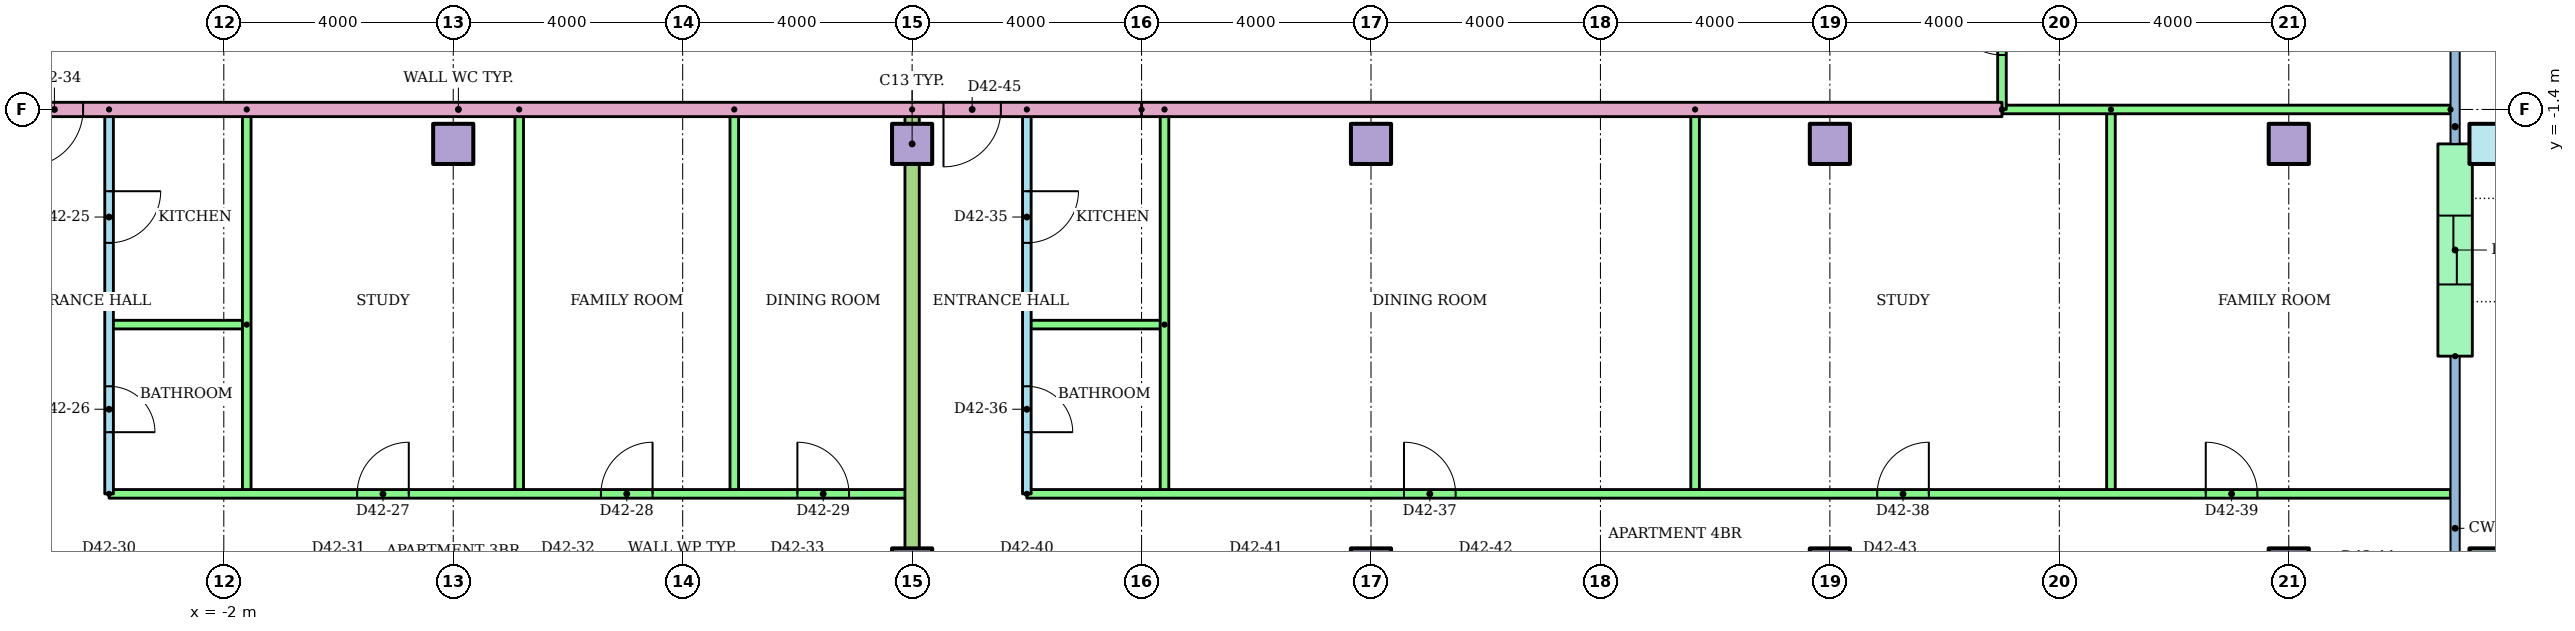
"""IFC4 building model, lengths in metres.
Left out: names, types, materials, properties, quantities, classifications, styles, units other than length and angle.
Written with IfcOpenShell. Run it as: python <this file> out.ifc"""

import sys

from ifc_helpers import new_model, si_unit, direction, frame, frame_2d, origin, origin_2d, place, context, subcontext, project, spatial, rectangle, hollow_rectangle, extrude, element, fill, save


model = new_model("IFC4")
c1 = context("Model", 3, precision=1e-05, world=origin(), true_north=direction((0.0, 1.0)))
c2 = subcontext(c1, "Body", "Model", "MODEL_VIEW")
j1 = project(units=[si_unit("LENGTHUNIT", "METRE"), si_unit("PLANEANGLEUNIT", "RADIAN")], contexts=[c1])
p1 = place(None, origin())
s1 = spatial("IfcSite", under=j1, at=p1, CompositionType="ELEMENT")
p2 = place(p1, origin())
s2 = spatial("IfcBuilding", under=s1, at=p2, CompositionType="ELEMENT")
p3 = place(p2, frame((0.0, 0.0, 165.3)))
s3 = spatial("IfcBuildingStorey", under=s2, at=p3, CompositionType="ELEMENT", Elevation=165.3)
for number, where in (
    (1, (2.0, -9.4, 0.0)),
    (2, (10.0, -9.4, 0.0)),
    (3, (18.0, -9.4, 0.0)),
    (4, (26.0, -9.4, 0.0)),
    (5, (34.0, -9.4, 0.0)),
):
    element("IfcColumn", number, at=place(p3, frame(where)), inside=s3, PredefinedType="COLUMN", context=c2, shape_type="SweptSolid", body=[
        extrude(rectangle(XDim=0.7, YDim=0.7, at=origin_2d()), origin(), (0.0, 0.0, 1.0), 3.2),
    ])
p4 = place(p3, frame((37.5, -9.4, 0.0)))
e6 = element("IfcColumn", 6, at=p4, inside=s3, PredefinedType="COLUMN", context=c2, shape_type="SweptSolid", body=[
    extrude(hollow_rectangle(XDim=0.7, YDim=0.7, WallThickness=0.036, at=origin_2d()), origin(), (0.0, 0.0, 1.0), 3.2),
])
for number, where in (
    (7, (2.0, -2.0, 0.0)),
    (8, (10.0, -2.0, 0.0)),
    (9, (18.0, -2.0, 0.0)),
    (10, (26.0, -2.0, 0.0)),
    (11, (34.0, -2.0, 0.0)),
):
    element("IfcColumn", number, at=place(p3, frame(where)), inside=s3, PredefinedType="COLUMN", context=c2, shape_type="SweptSolid", body=[
        extrude(rectangle(XDim=0.7, YDim=0.7, at=origin_2d()), origin(), (0.0, 0.0, 1.0), 3.2),
    ])
p5 = place(p3, frame((37.5, -2.0, 0.0)))
e12 = element("IfcColumn", 12, at=p5, inside=s3, PredefinedType="COLUMN", context=c2, shape_type="SweptSolid", body=[
    extrude(hollow_rectangle(XDim=0.7, YDim=0.7, WallThickness=0.036, at=origin_2d()), origin(), (0.0, 0.0, 1.0), 3.2),
])
p6 = place(p3, frame((36.9, -5.7, 0.0), z_axis=(0.0, 0.0, 1.0), x_axis=(0.0, 1.0, 0.0)))
e13 = element("IfcWall", 13, at=p6, inside=s3, PredefinedType="STANDARD", context=c2, shape_type="SweptSolid", body=[
    extrude(rectangle(XDim=3.7, YDim=0.6, at=frame_2d((1.85, 0.0))), origin(), (0.0, 0.0, 1.0), 2.92),
])
p7 = place(p6, frame((1.25, 0.0, 0.0)))
e14 = element("IfcOpeningElement", 14, at=p7, cuts=e13, PredefinedType="OPENING", context=c2, shape_type="SweptSolid", body=[
    extrude(rectangle(XDim=1.2, YDim=2.1, at=frame_2d((0.6, 1.05))), frame((0.0, 0.31, 0.0), z_axis=(0.0, -1.0, 0.0), x_axis=(1.0, 0.0, 0.0)), (0.0, 0.0, 1.0), 0.62),
])
p8 = place(p3, frame((-4.0, -1.4, 0.0), z_axis=(0.0, 0.0, 1.0), x_axis=(0.0, -1.0, 0.0)))
e15 = element("IfcWall", 15, at=p8, inside=s3, PredefinedType="PARTITIONING", context=c2, shape_type="SweptSolid", body=[
    extrude(rectangle(XDim=6.7, YDim=0.15, at=frame_2d((3.35, 0.0))), origin(), (0.0, 0.0, 1.0), 2.4),
])
p9 = place(p8, frame((1.425, 0.0, 0.0)))
e16 = element("IfcOpeningElement", 16, at=p9, cuts=e15, PredefinedType="OPENING", context=c2, shape_type="SweptSolid", body=[
    extrude(rectangle(XDim=0.9, YDim=2.1, at=frame_2d((0.45, 1.05))), frame((0.0, 0.085, 0.0), z_axis=(0.0, -1.0, 0.0), x_axis=(1.0, 0.0, 0.0)), (0.0, 0.0, 1.0), 0.17),
])
p10 = place(p8, frame((4.825, 0.0, 0.0)))
e17 = element("IfcOpeningElement", 17, at=p10, cuts=e15, PredefinedType="OPENING", context=c2, shape_type="SweptSolid", body=[
    extrude(rectangle(XDim=0.8, YDim=2.1, at=frame_2d((0.4, 1.05))), frame((0.0, 0.085, 0.0), z_axis=(0.0, -1.0, 0.0), x_axis=(1.0, 0.0, 0.0)), (0.0, 0.0, 1.0), 0.17),
])
p11 = place(p3, frame((-1.6, -5.15, 0.0), z_axis=(0.0, 0.0, 1.0), x_axis=(-1.0, 0.0, 0.0)))
e18 = element("IfcWall", 18, at=p11, inside=s3, PredefinedType="PARTITIONING", context=c2, shape_type="SweptSolid", body=[
    extrude(rectangle(XDim=2.4, YDim=0.15, at=frame_2d((1.2, 0.0))), origin(), (0.0, 0.0, 1.0), 2.4),
])
for number, where, z_axis, x_axis in (
    (19, (-1.6, -1.4, 0.0), (0.0, 0.0, 1.0), (0.0, -1.0, 0.0)),
    (20, (3.15, -1.4, 0.0), (0.0, 0.0, 1.0), (0.0, -1.0, 0.0)),
    (21, (6.9, -1.4, 0.0), (0.0, 0.0, 1.0), (0.0, -1.0, 0.0)),
):
    element("IfcWall", number, at=place(p3, frame(where, z_axis=z_axis, x_axis=x_axis)), inside=s3, PredefinedType="PARTITIONING", context=c2, shape_type="SweptSolid", body=[
        extrude(rectangle(XDim=6.7, YDim=0.15, at=frame_2d((3.35, 0.0))), origin(), (0.0, 0.0, 1.0), 2.4),
    ])
p12 = place(p3, frame((-4.0, -8.1, 0.0)))
e22 = element("IfcWall", 22, at=p12, inside=s3, PredefinedType="PARTITIONING", context=c2, shape_type="SweptSolid", body=[
    extrude(rectangle(XDim=14.0, YDim=0.15, at=frame_2d((7.0, 0.0))), origin(), (0.0, 0.0, 1.0), 2.4),
])
p13 = place(p12, frame((4.325, 0.0, 0.0)))
e23 = element("IfcOpeningElement", 23, at=p13, cuts=e22, PredefinedType="OPENING", context=c2, shape_type="SweptSolid", body=[
    extrude(rectangle(XDim=0.9, YDim=2.1, at=frame_2d((0.45, 1.05))), frame((0.0, 0.085, 0.0), z_axis=(0.0, -1.0, 0.0), x_axis=(1.0, 0.0, 0.0)), (0.0, 0.0, 1.0), 0.17),
])
p14 = place(p12, frame((8.575, 0.0, 0.0)))
e24 = element("IfcOpeningElement", 24, at=p14, cuts=e22, PredefinedType="OPENING", context=c2, shape_type="SweptSolid", body=[
    extrude(rectangle(XDim=0.9, YDim=2.1, at=frame_2d((0.45, 1.05))), frame((0.0, 0.085, 0.0), z_axis=(0.0, -1.0, 0.0), x_axis=(1.0, 0.0, 0.0)), (0.0, 0.0, 1.0), 0.17),
])
p15 = place(p12, frame((12.0, 0.0, 0.0)))
e25 = element("IfcOpeningElement", 25, at=p15, cuts=e22, PredefinedType="OPENING", context=c2, shape_type="SweptSolid", body=[
    extrude(rectangle(XDim=0.9, YDim=2.1, at=frame_2d((0.45, 1.05))), frame((0.0, 0.085, 0.0), z_axis=(0.0, -1.0, 0.0), x_axis=(1.0, 0.0, 0.0)), (0.0, 0.0, 1.0), 0.17),
])
p16 = place(p3, frame((12.0, -1.4, 0.0), z_axis=(0.0, 0.0, 1.0), x_axis=(0.0, -1.0, 0.0)))
e26 = element("IfcWall", 26, at=p16, inside=s3, PredefinedType="PARTITIONING", context=c2, shape_type="SweptSolid", body=[
    extrude(rectangle(XDim=6.7, YDim=0.15, at=frame_2d((3.35, 0.0))), origin(), (0.0, 0.0, 1.0), 2.4),
])
p17 = place(p16, frame((1.425, 0.0, 0.0)))
e27 = element("IfcOpeningElement", 27, at=p17, cuts=e26, PredefinedType="OPENING", context=c2, shape_type="SweptSolid", body=[
    extrude(rectangle(XDim=0.9, YDim=2.1, at=frame_2d((0.45, 1.05))), frame((0.0, 0.085, 0.0), z_axis=(0.0, -1.0, 0.0), x_axis=(1.0, 0.0, 0.0)), (0.0, 0.0, 1.0), 0.17),
])
p18 = place(p16, frame((4.825, 0.0, 0.0)))
e28 = element("IfcOpeningElement", 28, at=p18, cuts=e26, PredefinedType="OPENING", context=c2, shape_type="SweptSolid", body=[
    extrude(rectangle(XDim=0.8, YDim=2.1, at=frame_2d((0.4, 1.05))), frame((0.0, 0.085, 0.0), z_axis=(0.0, -1.0, 0.0), x_axis=(1.0, 0.0, 0.0)), (0.0, 0.0, 1.0), 0.17),
])
p19 = place(p3, frame((14.4, -5.15, 0.0), z_axis=(0.0, 0.0, 1.0), x_axis=(-1.0, 0.0, 0.0)))
e29 = element("IfcWall", 29, at=p19, inside=s3, PredefinedType="PARTITIONING", context=c2, shape_type="SweptSolid", body=[
    extrude(rectangle(XDim=2.4, YDim=0.15, at=frame_2d((1.2, 0.0))), origin(), (0.0, 0.0, 1.0), 2.4),
])
for number, where, z_axis, x_axis in (
    (30, (14.4, -1.4, 0.0), (0.0, 0.0, 1.0), (0.0, -1.0, 0.0)),
    (31, (23.65, -1.4, 0.0), (0.0, 0.0, 1.0), (0.0, -1.0, 0.0)),
    (32, (30.9, -1.4, 0.0), (0.0, 0.0, 1.0), (0.0, -1.0, 0.0)),
):
    element("IfcWall", number, at=place(p3, frame(where, z_axis=z_axis, x_axis=x_axis)), inside=s3, PredefinedType="PARTITIONING", context=c2, shape_type="SweptSolid", body=[
        extrude(rectangle(XDim=6.7, YDim=0.15, at=frame_2d((3.35, 0.0))), origin(), (0.0, 0.0, 1.0), 2.4),
    ])
p20 = place(p3, frame((12.0, -8.1, 0.0)))
e33 = element("IfcWall", 33, at=p20, inside=s3, PredefinedType="PARTITIONING", context=c2, shape_type="SweptSolid", body=[
    extrude(rectangle(XDim=24.82, YDim=0.15, at=frame_2d((12.41, 0.0))), origin(), (0.0, 0.0, 1.0), 2.4),
])
p21 = place(p20, frame((6.575, 0.0, 0.0)))
e34 = element("IfcOpeningElement", 34, at=p21, cuts=e33, PredefinedType="OPENING", context=c2, shape_type="SweptSolid", body=[
    extrude(rectangle(XDim=0.9, YDim=2.1, at=frame_2d((0.45, 1.05))), frame((0.0, 0.085, 0.0), z_axis=(0.0, -1.0, 0.0), x_axis=(1.0, 0.0, 0.0)), (0.0, 0.0, 1.0), 0.17),
])
p22 = place(p20, frame((14.825, 0.0, 0.0)))
e35 = element("IfcOpeningElement", 35, at=p22, cuts=e33, PredefinedType="OPENING", context=c2, shape_type="SweptSolid", body=[
    extrude(rectangle(XDim=0.9, YDim=2.1, at=frame_2d((0.45, 1.05))), frame((0.0, 0.085, 0.0), z_axis=(0.0, -1.0, 0.0), x_axis=(1.0, 0.0, 0.0)), (0.0, 0.0, 1.0), 0.17),
])
p23 = place(p20, frame((20.553, 0.0, 0.0)))
e36 = element("IfcOpeningElement", 36, at=p23, cuts=e33, PredefinedType="OPENING", context=c2, shape_type="SweptSolid", body=[
    extrude(rectangle(XDim=0.9, YDim=2.1, at=frame_2d((0.45, 1.05))), frame((0.0, 0.085, 0.0), z_axis=(0.0, -1.0, 0.0), x_axis=(1.0, 0.0, 0.0)), (0.0, 0.0, 1.0), 0.17),
])
p24 = place(p3, frame((10.0, -1.4, 0.0), z_axis=(0.0, 0.0, 1.0), x_axis=(0.0, -1.0, 0.0)))
e37 = element("IfcWall", 37, at=p24, inside=s3, PredefinedType="PARTITIONING", context=c2, shape_type="SweptSolid", body=[
    extrude(rectangle(XDim=15.01, YDim=0.25, at=frame_2d((7.505, 0.0))), origin(), (0.0, 0.0, 1.0), 2.4),
])
p25 = place(p3, frame((29.0, -1.4, 0.0), z_axis=(0.0, 0.0, 1.0), x_axis=(-1.0, 0.0, 0.0)))
e38 = element("IfcWall", 38, at=p25, inside=s3, PredefinedType="PARTITIONING", context=c2, shape_type="SweptSolid", body=[
    extrude(rectangle(XDim=15.0, YDim=0.25, at=frame_2d((7.5, 0.0))), origin(), (0.0, 0.0, 1.0), 2.4),
])
p26 = place(p3, frame((36.82, -1.4, 0.0), z_axis=(0.0, 0.0, 1.0), x_axis=(-1.0, 0.0, 0.0)))
e39 = element("IfcWall", 39, at=p26, inside=s3, PredefinedType="PARTITIONING", context=c2, shape_type="SweptSolid", body=[
    extrude(rectangle(XDim=7.82, YDim=0.15, at=frame_2d((3.91, 0.0))), origin(), (0.0, 0.0, 1.0), 2.4),
])
p27 = place(p3, frame((29.0, -1.4, 0.0), z_axis=(0.0, 0.0, 1.0), x_axis=(0.0, 1.0, 0.0)))
e40 = element("IfcWall", 40, at=p27, inside=s3, PredefinedType="PARTITIONING", context=c2, shape_type="SweptSolid", body=[
    extrude(rectangle(XDim=2.8, YDim=0.15, at=frame_2d((1.4, 0.0))), origin(), (0.0, 0.0, 1.0), 2.4),
])
p28 = place(p27, frame((0.95, 0.0, 0.0)))
e41 = element("IfcOpeningElement", 41, at=p28, cuts=e40, PredefinedType="OPENING", context=c2, shape_type="SweptSolid", body=[
    extrude(rectangle(XDim=0.9, YDim=2.1, at=frame_2d((0.45, 1.05))), frame((0.0, 0.085, 0.0), z_axis=(0.0, -1.0, 0.0), x_axis=(1.0, 0.0, 0.0)), (0.0, 0.0, 1.0), 0.17),
])
p29 = place(p3, frame((14.0, -1.4, 0.0), z_axis=(0.0, 0.0, 1.0), x_axis=(-1.0, 0.0, 0.0)))
e42 = element("IfcWall", 42, at=p29, inside=s3, PredefinedType="PARTITIONING", context=c2, shape_type="SweptSolid", body=[
    extrude(rectangle(XDim=28.0, YDim=0.25, at=frame_2d((14.0, 0.0))), origin(), (0.0, 0.0, 1.0), 2.4),
])
p30 = place(p29, frame((20.547, 0.0, 0.0)))
e43 = element("IfcOpeningElement", 43, at=p30, cuts=e42, PredefinedType="OPENING", context=c2, shape_type="SweptSolid", body=[
    extrude(rectangle(XDim=1.0, YDim=2.1, at=frame_2d((0.5, 1.05))), frame((0.0, 0.135, 0.0), z_axis=(0.0, -1.0, 0.0), x_axis=(1.0, 0.0, 0.0)), (0.0, 0.0, 1.0), 0.27),
])
p31 = place(p29, frame((18.453, 0.0, 0.0)))
e44 = element("IfcOpeningElement", 44, at=p31, cuts=e42, PredefinedType="OPENING", context=c2, shape_type="SweptSolid", body=[
    extrude(rectangle(XDim=1.0, YDim=2.1, at=frame_2d((0.5, 1.05))), frame((0.0, 0.135, 0.0), z_axis=(0.0, -1.0, 0.0), x_axis=(1.0, 0.0, 0.0)), (0.0, 0.0, 1.0), 0.27),
])
p32 = place(p29, frame((2.453, 0.0, 0.0)))
e45 = element("IfcOpeningElement", 45, at=p32, cuts=e42, PredefinedType="OPENING", context=c2, shape_type="SweptSolid", body=[
    extrude(rectangle(XDim=1.0, YDim=2.1, at=frame_2d((0.5, 1.05))), frame((0.0, 0.135, 0.0), z_axis=(0.0, -1.0, 0.0), x_axis=(1.0, 0.0, 0.0)), (0.0, 0.0, 1.0), 0.27),
])
p33 = place(p9, origin())
e46 = element("IfcDoor", 46, at=p33, inside=s3, OperationType="SINGLE_SWING_LEFT", PredefinedType="DOOR", context=c2, shape_type="SweptSolid", body=[
    extrude(rectangle(XDim=0.9, YDim=2.1, at=frame_2d((0.45, 1.05))), frame((0.0, 0.025, 0.0), z_axis=(0.0, -1.0, 0.0), x_axis=(1.0, 0.0, 0.0)), (0.0, 0.0, 1.0), 0.05),
])
fill(e16, e46)
p34 = place(p10, origin())
e47 = element("IfcDoor", 47, at=p34, inside=s3, OperationType="SINGLE_SWING_RIGHT", PredefinedType="DOOR", context=c2, shape_type="SweptSolid", body=[
    extrude(rectangle(XDim=0.8, YDim=2.1, at=frame_2d((0.4, 1.05))), frame((0.0, 0.025, 0.0), z_axis=(0.0, -1.0, 0.0), x_axis=(1.0, 0.0, 0.0)), (0.0, 0.0, 1.0), 0.05),
])
fill(e17, e47)
p35 = place(p13, origin())
e48 = element("IfcDoor", 48, at=p35, inside=s3, OperationType="SINGLE_SWING_RIGHT", PredefinedType="DOOR", context=c2, shape_type="SweptSolid", body=[
    extrude(rectangle(XDim=0.9, YDim=2.1, at=frame_2d((0.45, 1.05))), frame((0.0, 0.025, 0.0), z_axis=(0.0, -1.0, 0.0), x_axis=(1.0, 0.0, 0.0)), (0.0, 0.0, 1.0), 0.05),
])
fill(e23, e48)
p36 = place(p14, origin())
e49 = element("IfcDoor", 49, at=p36, inside=s3, OperationType="SINGLE_SWING_RIGHT", PredefinedType="DOOR", context=c2, shape_type="SweptSolid", body=[
    extrude(rectangle(XDim=0.9, YDim=2.1, at=frame_2d((0.45, 1.05))), frame((0.0, 0.025, 0.0), z_axis=(0.0, -1.0, 0.0), x_axis=(1.0, 0.0, 0.0)), (0.0, 0.0, 1.0), 0.05),
])
fill(e24, e49)
p37 = place(p15, origin())
e50 = element("IfcDoor", 50, at=p37, inside=s3, OperationType="SINGLE_SWING_LEFT", PredefinedType="DOOR", context=c2, shape_type="SweptSolid", body=[
    extrude(rectangle(XDim=0.9, YDim=2.1, at=frame_2d((0.45, 1.05))), frame((0.0, 0.025, 0.0), z_axis=(0.0, -1.0, 0.0), x_axis=(1.0, 0.0, 0.0)), (0.0, 0.0, 1.0), 0.05),
])
fill(e25, e50)
p38 = place(p31, origin())
e51 = element("IfcDoor", 51, at=p38, inside=s3, OperationType="SINGLE_SWING_RIGHT", PredefinedType="DOOR", context=c2, shape_type="SweptSolid", body=[
    extrude(rectangle(XDim=1.0, YDim=2.1, at=frame_2d((0.5, 1.05))), frame((0.0, 0.025, 0.0), z_axis=(0.0, -1.0, 0.0), x_axis=(1.0, 0.0, 0.0)), (0.0, 0.0, 1.0), 0.05),
])
fill(e44, e51)
p39 = place(p17, origin())
e52 = element("IfcDoor", 52, at=p39, inside=s3, OperationType="SINGLE_SWING_LEFT", PredefinedType="DOOR", context=c2, shape_type="SweptSolid", body=[
    extrude(rectangle(XDim=0.9, YDim=2.1, at=frame_2d((0.45, 1.05))), frame((0.0, 0.025, 0.0), z_axis=(0.0, -1.0, 0.0), x_axis=(1.0, 0.0, 0.0)), (0.0, 0.0, 1.0), 0.05),
])
fill(e27, e52)
p40 = place(p18, origin())
e53 = element("IfcDoor", 53, at=p40, inside=s3, OperationType="SINGLE_SWING_RIGHT", PredefinedType="DOOR", context=c2, shape_type="SweptSolid", body=[
    extrude(rectangle(XDim=0.8, YDim=2.1, at=frame_2d((0.4, 1.05))), frame((0.0, 0.025, 0.0), z_axis=(0.0, -1.0, 0.0), x_axis=(1.0, 0.0, 0.0)), (0.0, 0.0, 1.0), 0.05),
])
fill(e28, e53)
p41 = place(p21, origin())
e54 = element("IfcDoor", 54, at=p41, inside=s3, OperationType="SINGLE_SWING_LEFT", PredefinedType="DOOR", context=c2, shape_type="SweptSolid", body=[
    extrude(rectangle(XDim=0.9, YDim=2.1, at=frame_2d((0.45, 1.05))), frame((0.0, 0.025, 0.0), z_axis=(0.0, -1.0, 0.0), x_axis=(1.0, 0.0, 0.0)), (0.0, 0.0, 1.0), 0.05),
])
fill(e34, e54)
p42 = place(p22, origin())
e55 = element("IfcDoor", 55, at=p42, inside=s3, OperationType="SINGLE_SWING_RIGHT", PredefinedType="DOOR", context=c2, shape_type="SweptSolid", body=[
    extrude(rectangle(XDim=0.9, YDim=2.1, at=frame_2d((0.45, 1.05))), frame((0.0, 0.025, 0.0), z_axis=(0.0, -1.0, 0.0), x_axis=(1.0, 0.0, 0.0)), (0.0, 0.0, 1.0), 0.05),
])
fill(e35, e55)
p43 = place(p23, origin())
e56 = element("IfcDoor", 56, at=p43, inside=s3, OperationType="SINGLE_SWING_LEFT", PredefinedType="DOOR", context=c2, shape_type="SweptSolid", body=[
    extrude(rectangle(XDim=0.9, YDim=2.1, at=frame_2d((0.45, 1.05))), frame((0.0, 0.025, 0.0), z_axis=(0.0, -1.0, 0.0), x_axis=(1.0, 0.0, 0.0)), (0.0, 0.0, 1.0), 0.05),
])
fill(e36, e56)
p44 = place(p32, origin())
e57 = element("IfcDoor", 57, at=p44, inside=s3, OperationType="SINGLE_SWING_RIGHT", PredefinedType="DOOR", context=c2, shape_type="SweptSolid", body=[
    extrude(rectangle(XDim=1.0, YDim=2.1, at=frame_2d((0.5, 1.05))), frame((0.0, 0.025, 0.0), z_axis=(0.0, -1.0, 0.0), x_axis=(1.0, 0.0, 0.0)), (0.0, 0.0, 1.0), 0.05),
])
fill(e45, e57)
p45 = place(p28, origin())
e58 = element("IfcDoor", 58, at=p45, inside=s3, OperationType="SINGLE_SWING_RIGHT", PredefinedType="DOOR", context=c2, shape_type="SweptSolid", body=[
    extrude(rectangle(XDim=0.9, YDim=2.1, at=frame_2d((0.45, 1.05))), frame((0.0, 0.025, 0.0), z_axis=(0.0, -1.0, 0.0), x_axis=(1.0, 0.0, 0.0)), (0.0, 0.0, 1.0), 0.05),
])
fill(e41, e58)
p46 = place(p7, origin())
e59 = element("IfcDoor", 59, at=p46, inside=s3, OperationType="SLIDING_TO_LEFT", PredefinedType="DOOR", context=c2, shape_type="SweptSolid", body=[
    extrude(rectangle(XDim=1.2, YDim=2.1, at=frame_2d((0.6, 1.05))), frame((0.0, 0.025, 0.0), z_axis=(0.0, -1.0, 0.0), x_axis=(1.0, 0.0, 0.0)), (0.0, 0.0, 1.0), 0.05),
])
fill(e14, e59)
save(model, sys.argv[1])
